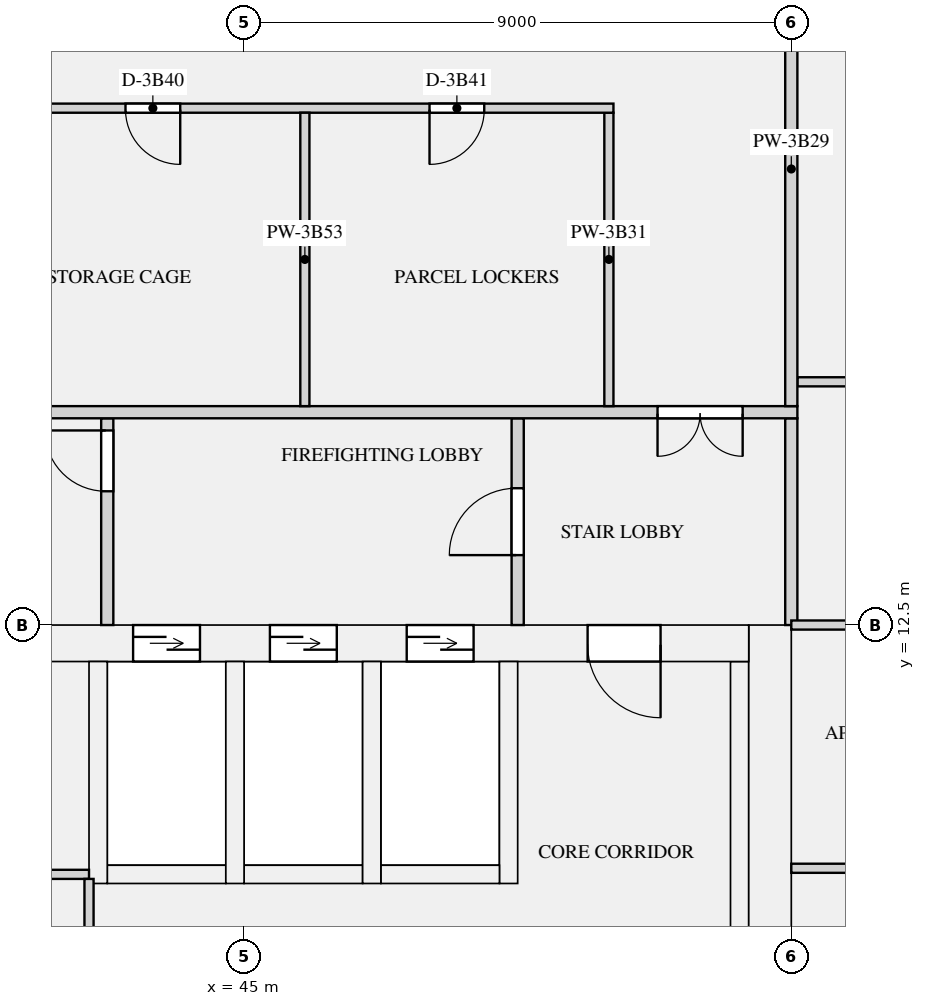
"""IFC4 building model, lengths in metres.
Left out: names, types, materials, properties, quantities, classifications, styles, units other than length and angle.
Written with IfcOpenShell. Run it as: python <this file> out.ifc"""

import sys

from ifc_helpers import new_model, si_unit, direction, frame, frame_2d, origin, place, context, subcontext, project, spatial, rectangle, extrude, element, fill, save


model = new_model("IFC4")
c1 = context("Model", 3, precision=1e-05, world=origin(), true_north=direction((0.0, 1.0)))
c2 = subcontext(c1, "Body", "Model", "MODEL_VIEW")
j1 = project(units=[si_unit("LENGTHUNIT", "METRE"), si_unit("PLANEANGLEUNIT", "RADIAN")], contexts=[c1])
p1 = place(None, origin())
s1 = spatial("IfcSite", under=j1, at=p1, CompositionType="ELEMENT")
p2 = place(p1, origin())
s2 = spatial("IfcBuilding", under=s1, at=p2, CompositionType="ELEMENT")
p3 = place(p2, frame((0.0, 0.0, 150.75)))
s3 = spatial("IfcBuildingStorey", under=s2, at=p3, CompositionType="ELEMENT", Elevation=150.75)
p4 = place(p3, frame((53.65, 0.0, 0.0), z_axis=(0.0, 0.0, 1.0), x_axis=(0.0, 1.0, 0.0)))
e1 = element("IfcWall", 1, at=p4, inside=s3, PredefinedType="SHEAR", context=c2, shape_type="SweptSolid", body=[
    extrude(rectangle(XDim=12.5, YDim=0.7, at=frame_2d((6.25, 0.0))), origin(), (0.0, 0.0, 1.0), 3.15),
])
p5 = place(p3, frame((18.7, 12.2, 0.0), z_axis=(0.0, 0.0, 1.0), x_axis=(1.0, 0.0, 0.0)))
e2 = element("IfcWall", 2, at=p5, inside=s3, PredefinedType="SHEAR", context=c2, shape_type="SweptSolid", body=[
    extrude(rectangle(XDim=34.6, YDim=0.6, at=frame_2d((17.3, 0.0))), origin(), (0.0, 0.0, 1.0), 3.15),
])
p6 = place(p5, frame((24.475, 0.0, 0.0)))
e3 = element("IfcOpeningElement", 3, at=p6, cuts=e2, PredefinedType="OPENING", context=c2, shape_type="SweptSolid", body=[
    extrude(rectangle(XDim=1.1, YDim=2.1, at=frame_2d((0.55, 1.05))), frame((0.0, 0.31, 0.0), z_axis=(0.0, -1.0, 0.0), x_axis=(1.0, 0.0, 0.0)), (0.0, 0.0, 1.0), 0.62),
])
p7 = place(p5, frame((26.725, 0.0, 0.0)))
e4 = element("IfcOpeningElement", 4, at=p7, cuts=e2, PredefinedType="OPENING", context=c2, shape_type="SweptSolid", body=[
    extrude(rectangle(XDim=1.1, YDim=2.1, at=frame_2d((0.55, 1.05))), frame((0.0, 0.31, 0.0), z_axis=(0.0, -1.0, 0.0), x_axis=(1.0, 0.0, 0.0)), (0.0, 0.0, 1.0), 0.62),
])
p8 = place(p5, frame((28.975, 0.0, 0.0)))
e5 = element("IfcOpeningElement", 5, at=p8, cuts=e2, PredefinedType="OPENING", context=c2, shape_type="SweptSolid", body=[
    extrude(rectangle(XDim=1.1, YDim=2.1, at=frame_2d((0.55, 1.05))), frame((0.0, 0.31, 0.0), z_axis=(0.0, -1.0, 0.0), x_axis=(1.0, 0.0, 0.0)), (0.0, 0.0, 1.0), 0.62),
])
p9 = place(p5, frame((4.85, 0.0, 0.0)))
e6 = element("IfcOpeningElement", 6, at=p9, cuts=e2, PredefinedType="OPENING", context=c2, shape_type="SweptSolid", body=[
    extrude(rectangle(XDim=0.9, YDim=2.1, at=frame_2d((0.45, 1.05))), frame((0.0, 0.31, 0.0), z_axis=(0.0, -1.0, 0.0), x_axis=(1.0, 0.0, 0.0)), (0.0, 0.0, 1.0), 0.62),
])
p10 = place(p5, frame((18.35, 0.0, 0.0)))
e7 = element("IfcOpeningElement", 7, at=p10, cuts=e2, PredefinedType="OPENING", context=c2, shape_type="SweptSolid", body=[
    extrude(rectangle(XDim=0.9, YDim=2.1, at=frame_2d((0.45, 1.05))), frame((0.0, 0.31, 0.0), z_axis=(0.0, -1.0, 0.0), x_axis=(1.0, 0.0, 0.0)), (0.0, 0.0, 1.0), 0.62),
])
p11 = place(p5, frame((1.45, 0.0, 0.0)))
e8 = element("IfcOpeningElement", 8, at=p11, cuts=e2, PredefinedType="OPENING", context=c2, shape_type="SweptSolid", body=[
    extrude(rectangle(XDim=1.2, YDim=2.1, at=frame_2d((0.6, 1.05))), frame((0.0, 0.31, 0.0), z_axis=(0.0, -1.0, 0.0), x_axis=(1.0, 0.0, 0.0)), (0.0, 0.0, 1.0), 0.62),
])
p12 = place(p5, frame((31.95, 0.0, 0.0)))
e9 = element("IfcOpeningElement", 9, at=p12, cuts=e2, PredefinedType="OPENING", context=c2, shape_type="SweptSolid", body=[
    extrude(rectangle(XDim=1.2, YDim=2.1, at=frame_2d((0.6, 1.05))), frame((0.0, 0.31, 0.0), z_axis=(0.0, -1.0, 0.0), x_axis=(1.0, 0.0, 0.0)), (0.0, 0.0, 1.0), 0.62),
])
p13 = place(p3, frame((53.15, 1.0, 0.0), z_axis=(0.0, 0.0, 1.0), x_axis=(0.0, 1.0, 0.0)))
e10 = element("IfcWall", 10, at=p13, inside=s3, PredefinedType="SHEAR", context=c2, shape_type="SweptSolid", body=[
    extrude(rectangle(XDim=10.9, YDim=0.3, at=frame_2d((5.45, 0.0))), origin(), (0.0, 0.0, 1.0), 3.15),
])
p14 = place(p3, frame((42.75, 8.4, 0.0), z_axis=(0.0, 0.0, 1.0), x_axis=(1.0, 0.0, 0.0)))
e11 = element("IfcWall", 11, at=p14, inside=s3, PredefinedType="SHEAR", context=c2, shape_type="SweptSolid", body=[
    extrude(rectangle(XDim=1.95, YDim=0.3, at=frame_2d((0.975, 0.0))), origin(), (0.0, 0.0, 1.0), 3.15),
])
p15 = place(p3, frame((42.6, 8.25, 0.0), z_axis=(0.0, 0.0, 1.0), x_axis=(0.0, 1.0, 0.0)))
e12 = element("IfcWall", 12, at=p15, inside=s3, PredefinedType="SHEAR", context=c2, shape_type="SweptSolid", body=[
    extrude(rectangle(XDim=3.65, YDim=0.3, at=frame_2d((1.825, 0.0))), origin(), (0.0, 0.0, 1.0), 3.15),
])
p16 = place(p3, frame((45.0, 8.4, 0.0), z_axis=(0.0, 0.0, 1.0), x_axis=(1.0, 0.0, 0.0)))
e13 = element("IfcWall", 13, at=p16, inside=s3, PredefinedType="SHEAR", context=c2, shape_type="SweptSolid", body=[
    extrude(rectangle(XDim=1.95, YDim=0.3, at=frame_2d((0.975, 0.0))), origin(), (0.0, 0.0, 1.0), 3.15),
])
p17 = place(p3, frame((44.85, 8.25, 0.0), z_axis=(0.0, 0.0, 1.0), x_axis=(0.0, 1.0, 0.0)))
e14 = element("IfcWall", 14, at=p17, inside=s3, PredefinedType="SHEAR", context=c2, shape_type="SweptSolid", body=[
    extrude(rectangle(XDim=3.65, YDim=0.3, at=frame_2d((1.825, 0.0))), origin(), (0.0, 0.0, 1.0), 3.15),
])
p18 = place(p3, frame((47.25, 8.4, 0.0), z_axis=(0.0, 0.0, 1.0), x_axis=(1.0, 0.0, 0.0)))
e15 = element("IfcWall", 15, at=p18, inside=s3, PredefinedType="SHEAR", context=c2, shape_type="SweptSolid", body=[
    extrude(rectangle(XDim=1.95, YDim=0.3, at=frame_2d((0.975, 0.0))), origin(), (0.0, 0.0, 1.0), 3.15),
])
for number, where, z_axis, x_axis in (
    (16, (47.1, 8.25, 0.0), (0.0, 0.0, 1.0), (0.0, 1.0, 0.0)),
    (17, (49.35, 8.25, 0.0), (0.0, 0.0, 1.0), (0.0, 1.0, 0.0)),
):
    element("IfcWall", number, at=place(p3, frame(where, z_axis=z_axis, x_axis=x_axis)), inside=s3, PredefinedType="SHEAR", context=c2, shape_type="SweptSolid", body=[
        extrude(rectangle(XDim=3.65, YDim=0.3, at=frame_2d((1.825, 0.0))), origin(), (0.0, 0.0, 1.0), 3.15),
    ])
p19 = place(p3, frame((36.675, 8.4, 0.0), z_axis=(0.0, 0.0, 1.0), x_axis=(1.0, 0.0, 0.0)))
e18 = element("IfcWall", 18, at=p19, inside=s3, PredefinedType="PARTITIONING", context=c2, shape_type="SweptSolid", body=[
    extrude(rectangle(XDim=5.775, YDim=0.15, at=frame_2d((2.887, 0.0))), origin(), (0.0, 0.0, 1.0), 2.83),
])
p20 = place(p3, frame((42.45, 6.65, 0.0), z_axis=(0.0, 0.0, 1.0), x_axis=(0.0, 1.0, 0.0)))
e19 = element("IfcWall", 19, at=p20, inside=s3, PredefinedType="PARTITIONING", context=c2, shape_type="SweptSolid", body=[
    extrude(rectangle(XDim=1.675, YDim=0.15, at=frame_2d((0.837, 0.0))), origin(), (0.0, 0.0, 1.0), 2.83),
])
p21 = place(p3, frame((42.75, 12.5, 0.0), z_axis=(0.0, 0.0, 1.0), x_axis=(0.0, 1.0, 0.0)))
e20 = element("IfcWall", 20, at=p21, inside=s3, PredefinedType="PARTITIONING", context=c2, shape_type="SweptSolid", body=[
    extrude(rectangle(XDim=3.4, YDim=0.2, at=frame_2d((1.7, 0.0))), origin(), (0.0, 0.0, 1.0), 2.83),
])
p22 = place(p21, frame((2.2, 0.0, 0.0)))
e21 = element("IfcOpeningElement", 21, at=p22, cuts=e20, PredefinedType="OPENING", context=c2, shape_type="SweptSolid", body=[
    extrude(rectangle(XDim=1.0, YDim=2.1, at=frame_2d((0.5, 1.05))), frame((0.0, 0.11, 0.0), z_axis=(0.0, -1.0, 0.0), x_axis=(1.0, 0.0, 0.0)), (0.0, 0.0, 1.0), 0.22),
])
p23 = place(p3, frame((49.5, 12.5, 0.0), z_axis=(0.0, 0.0, 1.0), x_axis=(0.0, 1.0, 0.0)))
e22 = element("IfcWall", 22, at=p23, inside=s3, PredefinedType="PARTITIONING", context=c2, shape_type="SweptSolid", body=[
    extrude(rectangle(XDim=3.4, YDim=0.2, at=frame_2d((1.7, 0.0))), origin(), (0.0, 0.0, 1.0), 2.83),
])
p24 = place(p23, frame((1.15, 0.0, 0.0)))
e23 = element("IfcOpeningElement", 23, at=p24, cuts=e22, PredefinedType="OPENING", context=c2, shape_type="SweptSolid", body=[
    extrude(rectangle(XDim=1.1, YDim=2.1, at=frame_2d((0.55, 1.05))), frame((0.0, 0.11, 0.0), z_axis=(0.0, -1.0, 0.0), x_axis=(1.0, 0.0, 0.0)), (0.0, 0.0, 1.0), 0.22),
])
p25 = place(p3, frame((54.0, 12.5, 0.0), z_axis=(0.0, 0.0, 1.0), x_axis=(0.0, 1.0, 0.0)))
e24 = element("IfcWall", 24, at=p25, inside=s3, PredefinedType="PARTITIONING", context=c2, shape_type="SweptSolid", body=[
    extrude(rectangle(XDim=3.4, YDim=0.2, at=frame_2d((1.7, 0.0))), origin(), (0.0, 0.0, 1.0), 2.83),
])
p26 = place(p3, frame((20.925, 21.0, 0.0), z_axis=(0.0, 0.0, 1.0), x_axis=(1.0, 0.0, 0.0)))
e25 = element("IfcWall", 25, at=p26, inside=s3, PredefinedType="PARTITIONING", context=c2, shape_type="SweptSolid", body=[
    extrude(rectangle(XDim=30.15, YDim=0.15, at=frame_2d((15.075, 0.0))), origin(), (0.0, 0.0, 1.0), 2.83),
])
p27 = place(p26, frame((2.125, 0.0, 0.0)))
e26 = element("IfcOpeningElement", 26, at=p27, cuts=e25, PredefinedType="OPENING", context=c2, shape_type="SweptSolid", body=[
    extrude(rectangle(XDim=0.9, YDim=2.1, at=frame_2d((0.45, 1.05))), frame((0.0, 0.085, 0.0), z_axis=(0.0, -1.0, 0.0), x_axis=(1.0, 0.0, 0.0)), (0.0, 0.0, 1.0), 0.17),
])
p28 = place(p26, frame((7.125, 0.0, 0.0)))
e27 = element("IfcOpeningElement", 27, at=p28, cuts=e25, PredefinedType="OPENING", context=c2, shape_type="SweptSolid", body=[
    extrude(rectangle(XDim=0.9, YDim=2.1, at=frame_2d((0.45, 1.05))), frame((0.0, 0.085, 0.0), z_axis=(0.0, -1.0, 0.0), x_axis=(1.0, 0.0, 0.0)), (0.0, 0.0, 1.0), 0.17),
])
p29 = place(p26, frame((12.125, 0.0, 0.0)))
e28 = element("IfcOpeningElement", 28, at=p29, cuts=e25, PredefinedType="OPENING", context=c2, shape_type="SweptSolid", body=[
    extrude(rectangle(XDim=0.9, YDim=2.1, at=frame_2d((0.45, 1.05))), frame((0.0, 0.085, 0.0), z_axis=(0.0, -1.0, 0.0), x_axis=(1.0, 0.0, 0.0)), (0.0, 0.0, 1.0), 0.17),
])
p30 = place(p26, frame((17.125, 0.0, 0.0)))
e29 = element("IfcOpeningElement", 29, at=p30, cuts=e25, PredefinedType="OPENING", context=c2, shape_type="SweptSolid", body=[
    extrude(rectangle(XDim=0.9, YDim=2.1, at=frame_2d((0.45, 1.05))), frame((0.0, 0.085, 0.0), z_axis=(0.0, -1.0, 0.0), x_axis=(1.0, 0.0, 0.0)), (0.0, 0.0, 1.0), 0.17),
])
p31 = place(p26, frame((22.125, 0.0, 0.0)))
e30 = element("IfcOpeningElement", 30, at=p31, cuts=e25, PredefinedType="OPENING", context=c2, shape_type="SweptSolid", body=[
    extrude(rectangle(XDim=0.9, YDim=2.1, at=frame_2d((0.45, 1.05))), frame((0.0, 0.085, 0.0), z_axis=(0.0, -1.0, 0.0), x_axis=(1.0, 0.0, 0.0)), (0.0, 0.0, 1.0), 0.17),
])
p32 = place(p26, frame((27.125, 0.0, 0.0)))
e31 = element("IfcOpeningElement", 31, at=p32, cuts=e25, PredefinedType="OPENING", context=c2, shape_type="SweptSolid", body=[
    extrude(rectangle(XDim=0.9, YDim=2.1, at=frame_2d((0.45, 1.05))), frame((0.0, 0.085, 0.0), z_axis=(0.0, -1.0, 0.0), x_axis=(1.0, 0.0, 0.0)), (0.0, 0.0, 1.0), 0.17),
])
p33 = place(p3, frame((54.1, 16.5, 0.0), z_axis=(0.0, 0.0, 1.0), x_axis=(1.0, 0.0, 0.0)))
e32 = element("IfcWall", 32, at=p33, inside=s3, PredefinedType="PARTITIONING", context=c2, shape_type="SweptSolid", body=[
    extrude(rectangle(XDim=4.325, YDim=0.15, at=frame_2d((2.163, 0.0))), origin(), (0.0, 0.0, 1.0), 2.83),
])
p34 = place(p3, frame((54.0, 8.5, 0.0), z_axis=(0.0, 0.0, 1.0), x_axis=(1.0, 0.0, 0.0)))
e33 = element("IfcWall", 33, at=p34, inside=s3, PredefinedType="PARTITIONING", context=c2, shape_type="SweptSolid", body=[
    extrude(rectangle(XDim=17.3, YDim=0.15, at=frame_2d((8.65, 0.0))), origin(), (0.0, 0.0, 1.0), 2.83),
])
p35 = place(p34, frame((1.8, 0.0, 0.0)))
e34 = element("IfcOpeningElement", 34, at=p35, cuts=e33, PredefinedType="OPENING", context=c2, shape_type="SweptSolid", body=[
    extrude(rectangle(XDim=0.9, YDim=2.1, at=frame_2d((0.45, 1.05))), frame((0.0, 0.085, 0.0), z_axis=(0.0, -1.0, 0.0), x_axis=(1.0, 0.0, 0.0)), (0.0, 0.0, 1.0), 0.17),
])
p36 = place(p34, frame((6.3, 0.0, 0.0)))
e35 = element("IfcOpeningElement", 35, at=p36, cuts=e33, PredefinedType="OPENING", context=c2, shape_type="SweptSolid", body=[
    extrude(rectangle(XDim=0.9, YDim=2.1, at=frame_2d((0.45, 1.05))), frame((0.0, 0.085, 0.0), z_axis=(0.0, -1.0, 0.0), x_axis=(1.0, 0.0, 0.0)), (0.0, 0.0, 1.0), 0.17),
])
p37 = place(p34, frame((10.8, 0.0, 0.0)))
e36 = element("IfcOpeningElement", 36, at=p37, cuts=e33, PredefinedType="OPENING", context=c2, shape_type="SweptSolid", body=[
    extrude(rectangle(XDim=0.9, YDim=2.1, at=frame_2d((0.45, 1.05))), frame((0.0, 0.085, 0.0), z_axis=(0.0, -1.0, 0.0), x_axis=(1.0, 0.0, 0.0)), (0.0, 0.0, 1.0), 0.17),
])
p38 = place(p34, frame((15.025, 0.0, 0.0)))
e37 = element("IfcOpeningElement", 37, at=p38, cuts=e33, PredefinedType="OPENING", context=c2, shape_type="SweptSolid", body=[
    extrude(rectangle(XDim=0.9, YDim=2.1, at=frame_2d((0.45, 1.05))), frame((0.0, 0.085, 0.0), z_axis=(0.0, -1.0, 0.0), x_axis=(1.0, 0.0, 0.0)), (0.0, 0.0, 1.0), 0.17),
])
p39 = place(p3, frame((54.0, 12.5, 0.0), z_axis=(0.0, 0.0, 1.0), x_axis=(1.0, 0.0, 0.0)))
e38 = element("IfcWall", 38, at=p39, inside=s3, PredefinedType="PARTITIONING", context=c2, shape_type="SweptSolid", body=[
    extrude(rectangle(XDim=17.3, YDim=0.15, at=frame_2d((8.65, 0.0))), origin(), (0.0, 0.0, 1.0), 2.83),
])
p40 = place(p39, frame((5.725, 0.0, 0.0)))
e39 = element("IfcOpeningElement", 39, at=p40, cuts=e38, PredefinedType="OPENING", context=c2, shape_type="SweptSolid", body=[
    extrude(rectangle(XDim=1.5, YDim=2.1, at=frame_2d((0.75, 1.05))), frame((0.0, 0.085, 0.0), z_axis=(0.0, -1.0, 0.0), x_axis=(1.0, 0.0, 0.0)), (0.0, 0.0, 1.0), 0.17),
])
p41 = place(p3, frame((17.9, 16.0, 0.0), z_axis=(0.0, 0.0, 1.0), x_axis=(1.0, 0.0, 0.0)))
e40 = element("IfcWall", 40, at=p41, inside=s3, PredefinedType="PARTITIONING", context=c2, shape_type="SweptSolid", body=[
    extrude(rectangle(XDim=36.2, YDim=0.2, at=frame_2d((18.1, 0.0))), origin(), (0.0, 0.0, 1.0), 2.83),
])
p42 = place(p41, frame((0.9, 0.0, 0.0)))
e41 = element("IfcOpeningElement", 41, at=p42, cuts=e40, PredefinedType="OPENING", context=c2, shape_type="SweptSolid", body=[
    extrude(rectangle(XDim=1.4, YDim=2.1, at=frame_2d((0.7, 1.05))), frame((0.0, 0.11, 0.0), z_axis=(0.0, -1.0, 0.0), x_axis=(1.0, 0.0, 0.0)), (0.0, 0.0, 1.0), 0.22),
])
p43 = place(p41, frame((33.9, 0.0, 0.0)))
e42 = element("IfcOpeningElement", 42, at=p43, cuts=e40, PredefinedType="OPENING", context=c2, shape_type="SweptSolid", body=[
    extrude(rectangle(XDim=1.4, YDim=2.1, at=frame_2d((0.7, 1.05))), frame((0.0, 0.11, 0.0), z_axis=(0.0, -1.0, 0.0), x_axis=(1.0, 0.0, 0.0)), (0.0, 0.0, 1.0), 0.22),
])
p44 = place(p3, frame((54.0, 16.1, 0.0), z_axis=(0.0, 0.0, 1.0), x_axis=(0.0, 1.0, 0.0)))
e43 = element("IfcWall", 43, at=p44, inside=s3, PredefinedType="PARTITIONING", context=c2, shape_type="SweptSolid", body=[
    extrude(rectangle(XDim=7.8, YDim=0.2, at=frame_2d((3.9, 0.0))), origin(), (0.0, 0.0, 1.0), 2.83),
])
for number, where, z_axis, x_axis in (
    (44, (51.0, 16.1, 0.0), (0.0, 0.0, 1.0), (0.0, 1.0, 0.0)),
    (45, (46.0, 16.1, 0.0), (0.0, 0.0, 1.0), (0.0, 1.0, 0.0)),
):
    element("IfcWall", number, at=place(p3, frame(where, z_axis=z_axis, x_axis=x_axis)), inside=s3, PredefinedType="PARTITIONING", context=c2, shape_type="SweptSolid", body=[
        extrude(rectangle(XDim=4.825, YDim=0.15, at=frame_2d((2.413, 0.0))), origin(), (0.0, 0.0, 1.0), 2.83),
    ])
p45 = place(p6, origin())
e46 = element("IfcDoor", 46, at=p45, inside=s3, OperationType="DOUBLE_DOOR_SLIDING", PredefinedType="DOOR", context=c2, shape_type="SweptSolid", body=[
    extrude(rectangle(XDim=1.1, YDim=2.1, at=frame_2d((0.55, 1.05))), frame((0.0, 0.025, 0.0), z_axis=(0.0, -1.0, 0.0), x_axis=(1.0, 0.0, 0.0)), (0.0, 0.0, 1.0), 0.05),
])
fill(e3, e46)
p46 = place(p7, origin())
e47 = element("IfcDoor", 47, at=p46, inside=s3, OperationType="DOUBLE_DOOR_SLIDING", PredefinedType="DOOR", context=c2, shape_type="SweptSolid", body=[
    extrude(rectangle(XDim=1.1, YDim=2.1, at=frame_2d((0.55, 1.05))), frame((0.0, 0.025, 0.0), z_axis=(0.0, -1.0, 0.0), x_axis=(1.0, 0.0, 0.0)), (0.0, 0.0, 1.0), 0.05),
])
fill(e4, e47)
p47 = place(p8, origin())
e48 = element("IfcDoor", 48, at=p47, inside=s3, OperationType="DOUBLE_DOOR_SLIDING", PredefinedType="DOOR", context=c2, shape_type="SweptSolid", body=[
    extrude(rectangle(XDim=1.1, YDim=2.1, at=frame_2d((0.55, 1.05))), frame((0.0, 0.025, 0.0), z_axis=(0.0, -1.0, 0.0), x_axis=(1.0, 0.0, 0.0)), (0.0, 0.0, 1.0), 0.05),
])
fill(e5, e48)
p48 = place(p12, frame((1.2, 0.0, 0.0), z_axis=(0.0, 0.0, 1.0), x_axis=(-1.0, 0.0, 0.0)))
e49 = element("IfcDoor", 49, at=p48, inside=s3, OperationType="SINGLE_SWING_LEFT", PredefinedType="DOOR", context=c2, shape_type="SweptSolid", body=[
    extrude(rectangle(XDim=1.2, YDim=2.1, at=frame_2d((0.6, 1.05))), frame((0.0, 0.025, 0.0), z_axis=(0.0, -1.0, 0.0), x_axis=(1.0, 0.0, 0.0)), (0.0, 0.0, 1.0), 0.05),
])
fill(e9, e49)
p49 = place(p22, origin())
e50 = element("IfcDoor", 50, at=p49, inside=s3, OperationType="SINGLE_SWING_RIGHT", PredefinedType="DOOR", context=c2, shape_type="SweptSolid", body=[
    extrude(rectangle(XDim=1.0, YDim=2.1, at=frame_2d((0.5, 1.05))), frame((0.0, 0.025, 0.0), z_axis=(0.0, -1.0, 0.0), x_axis=(1.0, 0.0, 0.0)), (0.0, 0.0, 1.0), 0.05),
])
fill(e21, e50)
p50 = place(p24, origin())
e51 = element("IfcDoor", 51, at=p50, inside=s3, OperationType="SINGLE_SWING_LEFT", PredefinedType="DOOR", context=c2, shape_type="SweptSolid", body=[
    extrude(rectangle(XDim=1.1, YDim=2.1, at=frame_2d((0.55, 1.05))), frame((0.0, 0.025, 0.0), z_axis=(0.0, -1.0, 0.0), x_axis=(1.0, 0.0, 0.0)), (0.0, 0.0, 1.0), 0.05),
])
fill(e23, e51)
p51 = place(p43, frame((1.4, 0.0, 0.0), z_axis=(0.0, 0.0, 1.0), x_axis=(-1.0, 0.0, 0.0)))
e52 = element("IfcDoor", 52, at=p51, inside=s3, OperationType="DOUBLE_DOOR_SINGLE_SWING", PredefinedType="DOOR", context=c2, shape_type="SweptSolid", body=[
    extrude(rectangle(XDim=1.4, YDim=2.1, at=frame_2d((0.7, 1.05))), frame((0.0, 0.025, 0.0), z_axis=(0.0, -1.0, 0.0), x_axis=(1.0, 0.0, 0.0)), (0.0, 0.0, 1.0), 0.05),
])
fill(e42, e52)
p52 = place(p31, frame((0.9, 0.0, 0.0), z_axis=(0.0, 0.0, 1.0), x_axis=(-1.0, 0.0, 0.0)))
e53 = element("IfcDoor", 53, at=p52, inside=s3, OperationType="SINGLE_SWING_LEFT", PredefinedType="DOOR", context=c2, shape_type="SweptSolid", body=[
    extrude(rectangle(XDim=0.9, YDim=2.1, at=frame_2d((0.45, 1.05))), frame((0.0, 0.025, 0.0), z_axis=(0.0, -1.0, 0.0), x_axis=(1.0, 0.0, 0.0)), (0.0, 0.0, 1.0), 0.05),
])
fill(e30, e53)
p53 = place(p32, frame((0.9, 0.0, 0.0), z_axis=(0.0, 0.0, 1.0), x_axis=(-1.0, 0.0, 0.0)))
e54 = element("IfcDoor", 54, at=p53, inside=s3, OperationType="SINGLE_SWING_RIGHT", PredefinedType="DOOR", context=c2, shape_type="SweptSolid", body=[
    extrude(rectangle(XDim=0.9, YDim=2.1, at=frame_2d((0.45, 1.05))), frame((0.0, 0.025, 0.0), z_axis=(0.0, -1.0, 0.0), x_axis=(1.0, 0.0, 0.0)), (0.0, 0.0, 1.0), 0.05),
])
fill(e31, e54)
save(model, sys.argv[1])
